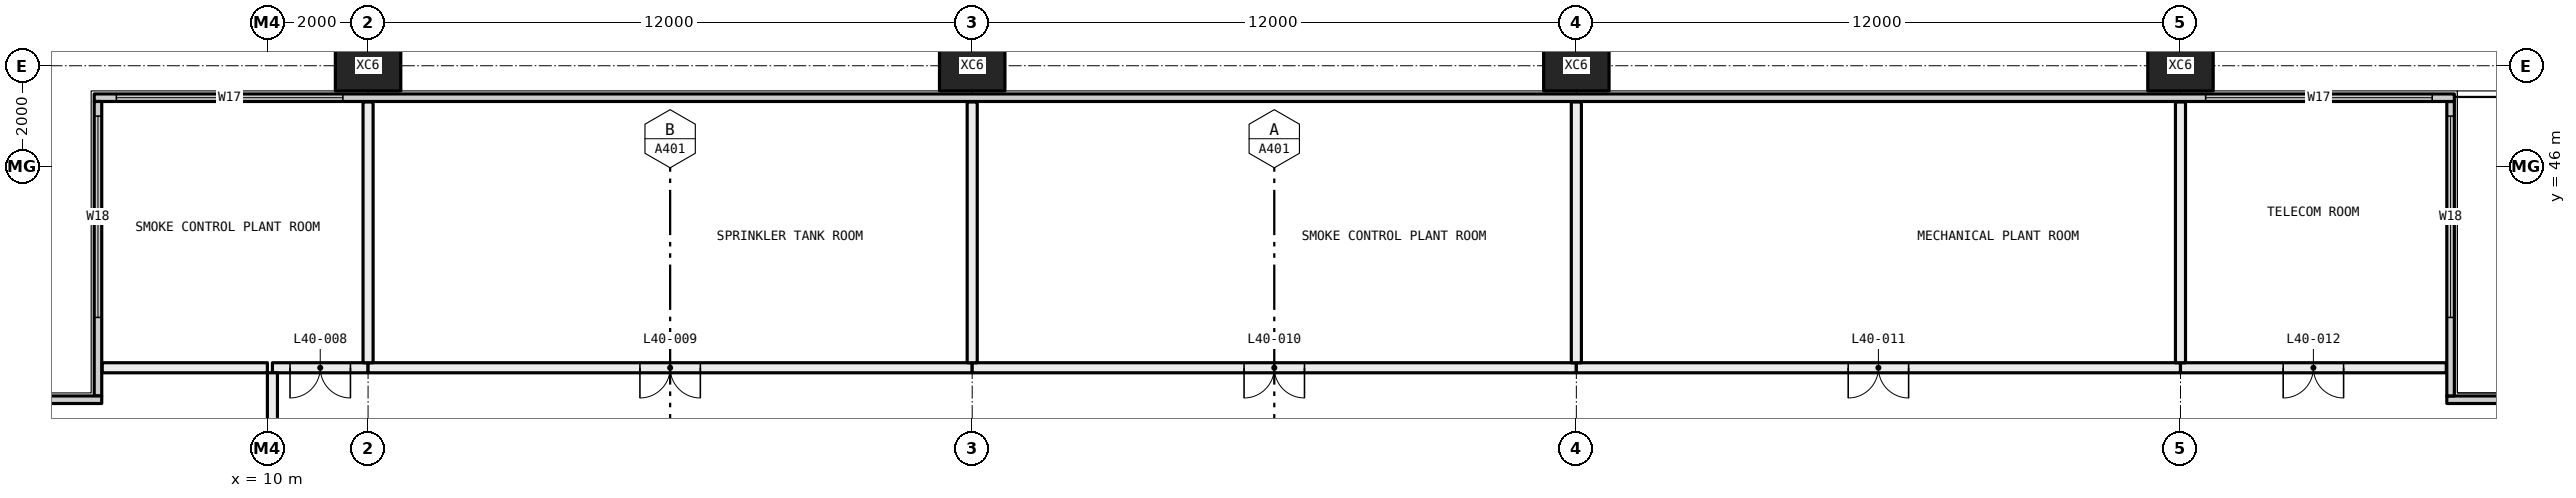
"""IFC4 building model, lengths in metres.
Left out: names, types, materials, properties, quantities, classifications, styles, units other than length and angle.
Written with IfcOpenShell. Run it as: python <this file> out.ifc"""

import sys

from ifc_helpers import new_model, si_unit, direction, frame, frame_2d, origin, origin_2d, place, context, subcontext, project, spatial, rectangle, hollow_rectangle, extrude, element, fill, save


model = new_model("IFC4")
c1 = context("Model", 3, precision=1e-05, world=origin(), true_north=direction((0.0, 1.0)))
c2 = subcontext(c1, "Body", "Model", "MODEL_VIEW")
j1 = project(units=[si_unit("LENGTHUNIT", "METRE"), si_unit("PLANEANGLEUNIT", "RADIAN")], contexts=[c1])
p1 = place(None, origin())
s1 = spatial("IfcSite", under=j1, at=p1, CompositionType="ELEMENT")
p2 = place(p1, origin())
s2 = spatial("IfcBuilding", under=s1, at=p2, CompositionType="ELEMENT")
p3 = place(p2, frame((0.0, 0.0, 153.75)))
s3 = spatial("IfcBuildingStorey", under=s2, at=p3, CompositionType="ELEMENT", Elevation=153.75)
for number, where, z_axis, x_axis in (
    (1, (12.0, 48.0, -0.4), (0.0, 0.0, 1.0), (1.0, 0.0, 0.0)),
    (2, (24.0, 48.0, -0.4), (0.0, 0.0, 1.0), (1.0, 0.0, 0.0)),
    (3, (36.0, 48.0, -0.4), (0.0, 0.0, 1.0), (1.0, 0.0, 0.0)),
    (4, (48.0, 48.0, -0.4), (0.0, 0.0, 1.0), (1.0, 0.0, 0.0)),
):
    element("IfcColumn", number, at=place(p3, frame(where, z_axis=z_axis, x_axis=x_axis)), inside=s3, PredefinedType="COLUMN", context=c2, shape_type="SweptSolid", body=[
        extrude(hollow_rectangle(XDim=1.3, YDim=1.0, WallThickness=0.05, at=origin_2d()), origin(), (0.0, 0.0, 1.0), 4.5),
    ])
p4 = place(p3, frame((53.29, 41.365, 0.0), z_axis=(0.0, 0.0, 1.0), x_axis=(1.0, 0.0, 0.0)))
e5 = element("IfcWall", 5, at=p4, inside=s3, PredefinedType="ELEMENTEDWALL", context=c2, shape_type="SweptSolid", body=[
    extrude(rectangle(XDim=6.15, YDim=0.15, at=frame_2d((3.075, 0.0))), origin(), (0.0, 0.0, 1.0), 4.1),
])
p5 = place(p4, frame((1.71, 0.0, 0.45)))
e6 = element("IfcOpeningElement", 6, at=p5, cuts=e5, PredefinedType="OPENING", context=c2, shape_type="SweptSolid", body=[
    extrude(rectangle(XDim=4.0, YDim=3.6, at=frame_2d((2.0, 1.8))), frame((0.0, 0.085, 0.0), z_axis=(0.0, -1.0, 0.0), x_axis=(1.0, 0.0, 0.0)), (0.0, 0.0, 1.0), 0.17),
])
p6 = place(p3, frame((53.365, 41.44, 0.0), z_axis=(0.0, 0.0, 1.0), x_axis=(0.0, 1.0, 0.0)))
e7 = element("IfcWall", 7, at=p6, inside=s3, PredefinedType="ELEMENTEDWALL", context=c2, shape_type="SweptSolid", body=[
    extrude(rectangle(XDim=5.85, YDim=0.15, at=frame_2d((2.925, 0.0))), origin(), (0.0, 0.0, 1.0), 4.1),
])
p7 = place(p6, frame((1.56, 0.0, 0.45)))
e8 = element("IfcOpeningElement", 8, at=p7, cuts=e7, PredefinedType="OPENING", context=c2, shape_type="SweptSolid", body=[
    extrude(rectangle(XDim=4.0, YDim=3.6, at=frame_2d((2.0, 1.8))), frame((0.0, 0.085, 0.0), z_axis=(0.0, -1.0, 0.0), x_axis=(1.0, 0.0, 0.0)), (0.0, 0.0, 1.0), 0.17),
])
p8 = place(p3, frame((6.56, 47.365, 0.0), z_axis=(0.0, 0.0, 1.0), x_axis=(1.0, 0.0, 0.0)))
e9 = element("IfcWall", 9, at=p8, inside=s3, PredefinedType="ELEMENTEDWALL", context=c2, shape_type="SweptSolid", body=[
    extrude(rectangle(XDim=46.88, YDim=0.15, at=frame_2d((23.44, 0.0))), origin(), (0.0, 0.0, 1.0), 4.1),
])
p9 = place(p8, frame((0.44, 0.0, 0.45)))
e10 = element("IfcOpeningElement", 10, at=p9, cuts=e9, PredefinedType="OPENING", context=c2, shape_type="SweptSolid", body=[
    extrude(rectangle(XDim=4.5, YDim=3.6, at=frame_2d((2.25, 1.8))), frame((0.0, 0.085, 0.0), z_axis=(0.0, -1.0, 0.0), x_axis=(1.0, 0.0, 0.0)), (0.0, 0.0, 1.0), 0.17),
])
p10 = place(p8, frame((41.94, 0.0, 0.45)))
e11 = element("IfcOpeningElement", 11, at=p10, cuts=e9, PredefinedType="OPENING", context=c2, shape_type="SweptSolid", body=[
    extrude(rectangle(XDim=4.5, YDim=3.6, at=frame_2d((2.25, 1.8))), frame((0.0, 0.085, 0.0), z_axis=(0.0, -1.0, 0.0), x_axis=(1.0, 0.0, 0.0)), (0.0, 0.0, 1.0), 0.17),
])
p11 = place(p3, frame((6.635, 41.44, 0.0), z_axis=(0.0, 0.0, 1.0), x_axis=(0.0, 1.0, 0.0)))
e12 = element("IfcWall", 12, at=p11, inside=s3, PredefinedType="ELEMENTEDWALL", context=c2, shape_type="SweptSolid", body=[
    extrude(rectangle(XDim=5.85, YDim=0.15, at=frame_2d((2.925, 0.0))), origin(), (0.0, 0.0, 1.0), 4.1),
])
p12 = place(p11, frame((1.56, 0.0, 0.45)))
e13 = element("IfcOpeningElement", 13, at=p12, cuts=e12, PredefinedType="OPENING", context=c2, shape_type="SweptSolid", body=[
    extrude(rectangle(XDim=4.0, YDim=3.6, at=frame_2d((2.0, 1.8))), frame((0.0, 0.085, 0.0), z_axis=(0.0, -1.0, 0.0), x_axis=(1.0, 0.0, 0.0)), (0.0, 0.0, 1.0), 0.17),
])
p13 = place(p3, frame((0.56, 41.365, 0.0), z_axis=(0.0, 0.0, 1.0), x_axis=(1.0, 0.0, 0.0)))
e14 = element("IfcWall", 14, at=p13, inside=s3, PredefinedType="ELEMENTEDWALL", context=c2, shape_type="SweptSolid", body=[
    extrude(rectangle(XDim=6.15, YDim=0.15, at=frame_2d((3.075, 0.0))), origin(), (0.0, 0.0, 1.0), 4.1),
])
p14 = place(p13, frame((0.44, 0.0, 0.45)))
e15 = element("IfcOpeningElement", 15, at=p14, cuts=e14, PredefinedType="OPENING", context=c2, shape_type="SweptSolid", body=[
    extrude(rectangle(XDim=4.0, YDim=3.6, at=frame_2d((2.0, 1.8))), frame((0.0, 0.085, 0.0), z_axis=(0.0, -1.0, 0.0), x_axis=(1.0, 0.0, 0.0)), (0.0, 0.0, 1.0), 0.17),
])
p15 = place(p3, frame((12.0, 42.0, 0.0), z_axis=(0.0, 0.0, 1.0), x_axis=(-1.0, 0.0, 0.0)))
e16 = element("IfcWall", 16, at=p15, inside=s3, PredefinedType="PARTITIONING", context=c2, shape_type="SweptSolid", body=[
    extrude(rectangle(XDim=1.9, YDim=0.2, at=frame_2d((0.95, 0.0))), origin(), (0.0, 0.0, 1.0), 4.1),
])
p16 = place(p15, frame((0.35, 0.0, 0.0)))
e17 = element("IfcOpeningElement", 17, at=p16, cuts=e16, PredefinedType="OPENING", context=c2, shape_type="SweptSolid", body=[
    extrude(rectangle(XDim=1.2, YDim=2.1, at=frame_2d((0.6, 1.05))), frame((0.0, 0.11, 0.0), z_axis=(0.0, -1.0, 0.0), x_axis=(1.0, 0.0, 0.0)), (0.0, 0.0, 1.0), 0.22),
])
p17 = place(p3, frame((24.0, 42.0, 0.0), z_axis=(0.0, 0.0, 1.0), x_axis=(-1.0, 0.0, 0.0)))
e18 = element("IfcWall", 18, at=p17, inside=s3, PredefinedType="PARTITIONING", context=c2, shape_type="SweptSolid", body=[
    extrude(rectangle(XDim=12.0, YDim=0.2, at=frame_2d((6.0, 0.0))), origin(), (0.0, 0.0, 1.0), 4.1),
])
p18 = place(p17, frame((5.4, 0.0, 0.0)))
e19 = element("IfcOpeningElement", 19, at=p18, cuts=e18, PredefinedType="OPENING", context=c2, shape_type="SweptSolid", body=[
    extrude(rectangle(XDim=1.2, YDim=2.1, at=frame_2d((0.6, 1.05))), frame((0.0, 0.11, 0.0), z_axis=(0.0, -1.0, 0.0), x_axis=(1.0, 0.0, 0.0)), (0.0, 0.0, 1.0), 0.22),
])
p19 = place(p3, frame((36.0, 42.0, 0.0), z_axis=(0.0, 0.0, 1.0), x_axis=(-1.0, 0.0, 0.0)))
e20 = element("IfcWall", 20, at=p19, inside=s3, PredefinedType="PARTITIONING", context=c2, shape_type="SweptSolid", body=[
    extrude(rectangle(XDim=12.0, YDim=0.2, at=frame_2d((6.0, 0.0))), origin(), (0.0, 0.0, 1.0), 3.5),
])
p20 = place(p19, frame((5.4, 0.0, 0.0)))
e21 = element("IfcOpeningElement", 21, at=p20, cuts=e20, PredefinedType="OPENING", context=c2, shape_type="SweptSolid", body=[
    extrude(rectangle(XDim=1.2, YDim=2.1, at=frame_2d((0.6, 1.05))), frame((0.0, 0.11, 0.0), z_axis=(0.0, -1.0, 0.0), x_axis=(1.0, 0.0, 0.0)), (0.0, 0.0, 1.0), 0.22),
])
p21 = place(p3, frame((48.0, 42.0, 0.0), z_axis=(0.0, 0.0, 1.0), x_axis=(-1.0, 0.0, 0.0)))
e22 = element("IfcWall", 22, at=p21, inside=s3, PredefinedType="PARTITIONING", context=c2, shape_type="SweptSolid", body=[
    extrude(rectangle(XDim=12.0, YDim=0.2, at=frame_2d((6.0, 0.0))), origin(), (0.0, 0.0, 1.0), 3.5),
])
p22 = place(p21, frame((5.4, 0.0, 0.0)))
e23 = element("IfcOpeningElement", 23, at=p22, cuts=e22, PredefinedType="OPENING", context=c2, shape_type="SweptSolid", body=[
    extrude(rectangle(XDim=1.2, YDim=2.1, at=frame_2d((0.6, 1.05))), frame((0.0, 0.11, 0.0), z_axis=(0.0, -1.0, 0.0), x_axis=(1.0, 0.0, 0.0)), (0.0, 0.0, 1.0), 0.22),
])
p23 = place(p3, frame((53.28, 42.0, 0.0), z_axis=(0.0, 0.0, 1.0), x_axis=(-1.0, 0.0, 0.0)))
e24 = element("IfcWall", 24, at=p23, inside=s3, PredefinedType="PARTITIONING", context=c2, shape_type="SweptSolid", body=[
    extrude(rectangle(XDim=5.28, YDim=0.2, at=frame_2d((2.64, 0.0))), origin(), (0.0, 0.0, 1.0), 4.1),
])
p24 = place(p23, frame((2.04, 0.0, 0.0)))
e25 = element("IfcOpeningElement", 25, at=p24, cuts=e24, PredefinedType="OPENING", context=c2, shape_type="SweptSolid", body=[
    extrude(rectangle(XDim=1.2, YDim=2.1, at=frame_2d((0.6, 1.05))), frame((0.0, 0.11, 0.0), z_axis=(0.0, -1.0, 0.0), x_axis=(1.0, 0.0, 0.0)), (0.0, 0.0, 1.0), 0.22),
])
p25 = place(p3, frame((10.1, 41.9, 0.0), z_axis=(0.0, 0.0, 1.0), x_axis=(0.0, -1.0, 0.0)))
e26 = element("IfcWall", 26, at=p25, inside=s3, PredefinedType="PARTITIONING", context=c2, shape_type="SweptSolid", body=[
    extrude(rectangle(XDim=17.9, YDim=0.2, at=frame_2d((8.95, 0.0))), origin(), (0.0, 0.0, 1.0), 3.5),
])
p26 = place(p25, frame((8.35, 0.0, 0.0)))
e27 = element("IfcOpeningElement", 27, at=p26, cuts=e26, PredefinedType="OPENING", context=c2, shape_type="SweptSolid", body=[
    extrude(rectangle(XDim=1.2, YDim=2.1, at=frame_2d((0.6, 1.05))), frame((0.0, 0.11, 0.0), z_axis=(0.0, -1.0, 0.0), x_axis=(1.0, 0.0, 0.0)), (0.0, 0.0, 1.0), 0.22),
])
p27 = place(p3, frame((12.0, 42.1, 0.0), z_axis=(0.0, 0.0, 1.0), x_axis=(0.0, 1.0, 0.0)))
e28 = element("IfcWall", 28, at=p27, inside=s3, PredefinedType="PARTITIONING", context=c2, shape_type="SweptSolid", body=[
    extrude(rectangle(XDim=5.18, YDim=0.2, at=frame_2d((2.59, 0.0))), origin(), (0.0, 0.0, 1.0), 4.1),
])
p28 = place(p3, frame((6.72, 42.0, 0.0), z_axis=(0.0, 0.0, 1.0), x_axis=(1.0, 0.0, 0.0)))
e29 = element("IfcWall", 29, at=p28, inside=s3, PredefinedType="PARTITIONING", context=c2, shape_type="SweptSolid", body=[
    extrude(rectangle(XDim=3.28, YDim=0.2, at=frame_2d((1.64, 0.0))), origin(), (0.0, 0.0, 1.0), 4.1),
])
p29 = place(p3, frame((24.0, 42.1, 0.0), z_axis=(0.0, 0.0, 1.0), x_axis=(0.0, 1.0, 0.0)))
e30 = element("IfcWall", 30, at=p29, inside=s3, PredefinedType="PARTITIONING", context=c2, shape_type="SweptSolid", body=[
    extrude(rectangle(XDim=5.18, YDim=0.2, at=frame_2d((2.59, 0.0))), origin(), (0.0, 0.0, 1.0), 4.1),
])
p30 = place(p3, frame((36.0, 42.1, 0.0), z_axis=(0.0, 0.0, 1.0), x_axis=(0.0, 1.0, 0.0)))
e31 = element("IfcWall", 31, at=p30, inside=s3, PredefinedType="PARTITIONING", context=c2, shape_type="SweptSolid", body=[
    extrude(rectangle(XDim=5.18, YDim=0.2, at=frame_2d((2.59, 0.0))), origin(), (0.0, 0.0, 1.0), 3.5),
])
p31 = place(p3, frame((48.0, 42.1, 0.0), z_axis=(0.0, 0.0, 1.0), x_axis=(0.0, 1.0, 0.0)))
e32 = element("IfcWall", 32, at=p31, inside=s3, PredefinedType="PARTITIONING", context=c2, shape_type="SweptSolid", body=[
    extrude(rectangle(XDim=5.18, YDim=0.2, at=frame_2d((2.59, 0.0))), origin(), (0.0, 0.0, 1.0), 4.1),
])
p32 = place(p7, origin())
e33 = element("IfcWindow", 33, at=p32, inside=s3, PartitioningType="SINGLE_PANEL", PredefinedType="WINDOW", context=c2, shape_type="SweptSolid", body=[
    extrude(rectangle(XDim=4.0, YDim=3.6, at=frame_2d((2.0, 1.8))), frame((0.0, 0.03, 0.0), z_axis=(0.0, -1.0, 0.0), x_axis=(1.0, 0.0, 0.0)), (0.0, 0.0, 1.0), 0.06),
])
fill(e8, e33)
p33 = place(p9, origin())
e34 = element("IfcWindow", 34, at=p33, inside=s3, PartitioningType="SINGLE_PANEL", PredefinedType="WINDOW", context=c2, shape_type="SweptSolid", body=[
    extrude(rectangle(XDim=4.5, YDim=3.6, at=frame_2d((2.25, 1.8))), frame((0.0, 0.03, 0.0), z_axis=(0.0, -1.0, 0.0), x_axis=(1.0, 0.0, 0.0)), (0.0, 0.0, 1.0), 0.06),
])
fill(e10, e34)
p34 = place(p10, origin())
e35 = element("IfcWindow", 35, at=p34, inside=s3, PartitioningType="SINGLE_PANEL", PredefinedType="WINDOW", context=c2, shape_type="SweptSolid", body=[
    extrude(rectangle(XDim=4.5, YDim=3.6, at=frame_2d((2.25, 1.8))), frame((0.0, 0.03, 0.0), z_axis=(0.0, -1.0, 0.0), x_axis=(1.0, 0.0, 0.0)), (0.0, 0.0, 1.0), 0.06),
])
fill(e11, e35)
p35 = place(p12, origin())
e36 = element("IfcWindow", 36, at=p35, inside=s3, PartitioningType="SINGLE_PANEL", PredefinedType="WINDOW", context=c2, shape_type="SweptSolid", body=[
    extrude(rectangle(XDim=4.0, YDim=3.6, at=frame_2d((2.0, 1.8))), frame((0.0, 0.03, 0.0), z_axis=(0.0, -1.0, 0.0), x_axis=(1.0, 0.0, 0.0)), (0.0, 0.0, 1.0), 0.06),
])
fill(e13, e36)
p36 = place(p16, origin())
e37 = element("IfcDoor", 37, at=p36, inside=s3, OperationType="DOUBLE_DOOR_SINGLE_SWING", PredefinedType="DOOR", context=c2, shape_type="SweptSolid", body=[
    extrude(rectangle(XDim=1.2, YDim=2.1, at=frame_2d((0.6, 1.05))), frame((0.0, 0.025, 0.0), z_axis=(0.0, -1.0, 0.0), x_axis=(1.0, 0.0, 0.0)), (0.0, 0.0, 1.0), 0.05),
])
fill(e17, e37)
p37 = place(p18, origin())
e38 = element("IfcDoor", 38, at=p37, inside=s3, OperationType="DOUBLE_DOOR_SINGLE_SWING", PredefinedType="DOOR", context=c2, shape_type="SweptSolid", body=[
    extrude(rectangle(XDim=1.2, YDim=2.1, at=frame_2d((0.6, 1.05))), frame((0.0, 0.025, 0.0), z_axis=(0.0, -1.0, 0.0), x_axis=(1.0, 0.0, 0.0)), (0.0, 0.0, 1.0), 0.05),
])
fill(e19, e38)
p38 = place(p20, origin())
e39 = element("IfcDoor", 39, at=p38, inside=s3, OperationType="DOUBLE_DOOR_SINGLE_SWING", PredefinedType="DOOR", context=c2, shape_type="SweptSolid", body=[
    extrude(rectangle(XDim=1.2, YDim=2.1, at=frame_2d((0.6, 1.05))), frame((0.0, 0.025, 0.0), z_axis=(0.0, -1.0, 0.0), x_axis=(1.0, 0.0, 0.0)), (0.0, 0.0, 1.0), 0.05),
])
fill(e21, e39)
p39 = place(p22, origin())
e40 = element("IfcDoor", 40, at=p39, inside=s3, OperationType="DOUBLE_DOOR_SINGLE_SWING", PredefinedType="DOOR", context=c2, shape_type="SweptSolid", body=[
    extrude(rectangle(XDim=1.2, YDim=2.1, at=frame_2d((0.6, 1.05))), frame((0.0, 0.025, 0.0), z_axis=(0.0, -1.0, 0.0), x_axis=(1.0, 0.0, 0.0)), (0.0, 0.0, 1.0), 0.05),
])
fill(e23, e40)
p40 = place(p24, origin())
e41 = element("IfcDoor", 41, at=p40, inside=s3, OperationType="DOUBLE_DOOR_SINGLE_SWING", PredefinedType="DOOR", context=c2, shape_type="SweptSolid", body=[
    extrude(rectangle(XDim=1.2, YDim=2.1, at=frame_2d((0.6, 1.05))), frame((0.0, 0.025, 0.0), z_axis=(0.0, -1.0, 0.0), x_axis=(1.0, 0.0, 0.0)), (0.0, 0.0, 1.0), 0.05),
])
fill(e25, e41)
save(model, sys.argv[1])
